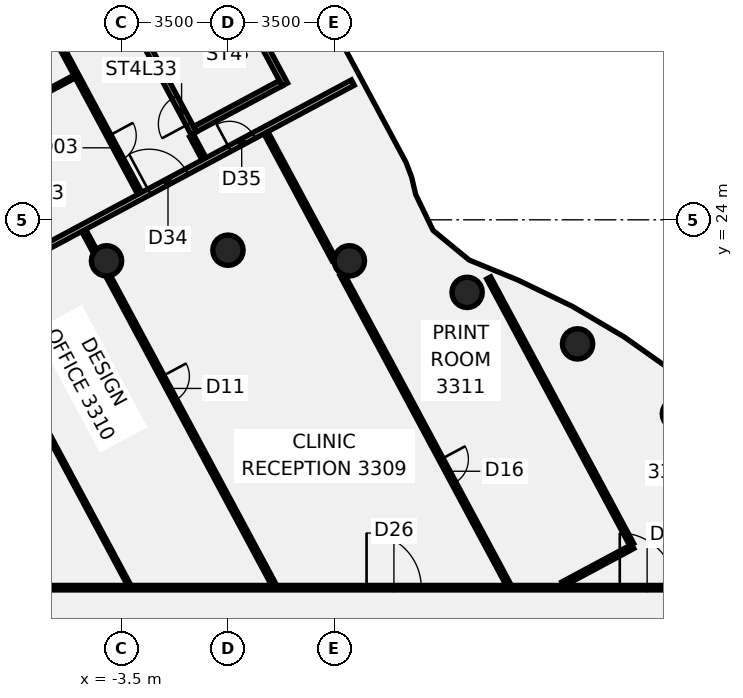
"""IFC4 building model, lengths in metres.
Left out: names, types, materials, properties, quantities, classifications, styles, units other than length and angle.
Written with IfcOpenShell. Run it as: python <this file> out.ifc"""

import sys

from ifc_helpers import new_model, si_unit, direction, frame, frame_2d, origin, origin_2d, place, context, subcontext, project, spatial, rectangle, circle, extrude, element, fill, save


model = new_model("IFC4")
c1 = context("Model", 3, precision=1e-05, world=origin(), true_north=direction((0.0, 1.0)))
c2 = subcontext(c1, "Body", "Model", "MODEL_VIEW")
j1 = project(units=[si_unit("LENGTHUNIT", "METRE"), si_unit("PLANEANGLEUNIT", "RADIAN")], contexts=[c1])
p1 = place(None, origin())
s1 = spatial("IfcSite", under=j1, at=p1, CompositionType="ELEMENT")
p2 = place(p1, origin())
s2 = spatial("IfcBuilding", under=s1, at=p2, CompositionType="ELEMENT")
p3 = place(p2, frame((0.0, 0.0, 136.75)))
s3 = spatial("IfcBuildingStorey", under=s2, at=p3, CompositionType="ELEMENT", Elevation=136.75)
for number, where, z_axis, x_axis in (
    (1, (14.784, 17.619, -0.14), (0.0, 0.0, 1.0), (1.0, 0.0, 0.0)),
    (2, (11.5, 19.919, -0.14), (0.0, 0.0, 1.0), (1.0, 0.0, 0.0)),
    (3, (7.866, 21.613, -0.14), (0.0, 0.0, 1.0), (1.0, 0.0, 0.0)),
    (4, (3.994, 22.651, -0.14), (0.0, 0.0, 1.0), (1.0, 0.0, 0.0)),
    (5, (0.0, 23.0, -0.14), (0.0, 0.0, 1.0), (1.0, 0.0, 0.0)),
    (6, (-3.994, 22.651, -0.14), (0.0, 0.0, 1.0), (1.0, 0.0, 0.0)),
):
    element("IfcColumn", number, at=place(p3, frame(where, z_axis=z_axis, x_axis=x_axis)), inside=s3, PredefinedType="COLUMN", context=c2, shape_type="SweptSolid", body=[
        extrude(circle(Radius=0.5, at=origin_2d()), origin(), (0.0, 0.0, 1.0), 3.75),
    ])
p4 = place(p3, frame((-11.326, 40.577, 0.0), z_axis=(0.0, 0.0, 1.0), x_axis=(0.472718875853, -0.881213291101, 0.0)))
e7 = element("IfcWall", 7, at=p4, inside=s3, PredefinedType="PARTITIONING", context=c2, shape_type="SweptSolid", body=[
    extrude(rectangle(XDim=17.825, YDim=0.15, at=frame_2d((8.912, 0.0))), origin(), (0.0, 0.0, 1.0), 3.01),
])
p5 = place(p4, frame((15.674, 0.0, 0.0)))
e8 = element("IfcOpeningElement", 8, at=p5, cuts=e7, PredefinedType="OPENING", context=c2, shape_type="SweptSolid", body=[
    extrude(rectangle(XDim=0.9, YDim=2.1, at=frame_2d((0.45, 1.05))), frame((0.0, 0.085, 0.0), z_axis=(0.0, -1.0, 0.0), x_axis=(1.0, 0.0, 0.0)), (0.0, 0.0, 1.0), 0.17),
])
p6 = place(p4, frame((10.125, 0.0, 0.0)))
e9 = element("IfcOpeningElement", 9, at=p6, cuts=e7, PredefinedType="OPENING", context=c2, shape_type="SweptSolid", body=[
    extrude(rectangle(XDim=0.9, YDim=2.1, at=frame_2d((0.45, 1.05))), frame((0.0, 0.085, 0.0), z_axis=(0.0, -1.0, 0.0), x_axis=(1.0, 0.0, 0.0)), (0.0, 0.0, 1.0), 0.17),
])
p7 = place(p4, frame((6.824, 0.0, 0.0)))
e10 = element("IfcOpeningElement", 10, at=p7, cuts=e7, PredefinedType="OPENING", context=c2, shape_type="SweptSolid", body=[
    extrude(rectangle(XDim=0.9, YDim=2.1, at=frame_2d((0.45, 1.05))), frame((0.0, 0.085, 0.0), z_axis=(0.0, -1.0, 0.0), x_axis=(1.0, 0.0, 0.0)), (0.0, 0.0, 1.0), 0.17),
])
p8 = place(p4, frame((2.325, 0.0, 0.0)))
e11 = element("IfcOpeningElement", 11, at=p8, cuts=e7, PredefinedType="OPENING", context=c2, shape_type="SweptSolid", body=[
    extrude(rectangle(XDim=0.9, YDim=2.1, at=frame_2d((0.45, 1.05))), frame((0.0, 0.085, 0.0), z_axis=(0.0, -1.0, 0.0), x_axis=(1.0, 0.0, 0.0)), (0.0, 0.0, 1.0), 0.17),
])
p9 = place(p3, frame((-8.247, 21.297, 0.0), z_axis=(0.0, 0.0, 1.0), x_axis=(0.472660277338, -0.881244723234, 0.0)))
e12 = element("IfcWall", 12, at=p9, inside=s3, PredefinedType="PARTITIONING", context=c2, shape_type="SweptSolid", body=[
    extrude(rectangle(XDim=10.573, YDim=0.1, at=frame_2d((5.287, 0.0))), origin(), (0.0, 0.0, 1.0), 3.01),
])
p10 = place(p3, frame((-1.193, 26.762, 0.0), z_axis=(0.0, 0.0, 1.0), x_axis=(0.472575809363, -0.881290022867, 0.0)))
e13 = element("IfcWall", 13, at=p10, inside=s3, PredefinedType="PARTITIONING", context=c2, shape_type="SweptSolid", body=[
    extrude(rectangle(XDim=0.86, YDim=0.15, at=frame_2d((0.43, 0.0))), origin(), (0.0, 0.0, 1.0), 3.01),
])
p11 = place(p3, frame((-4.745, 23.653, 0.0), z_axis=(0.0, 0.0, 1.0), x_axis=(0.472438455884, -0.881363662401, 0.0)))
e14 = element("IfcWall", 14, at=p11, inside=s3, PredefinedType="PARTITIONING", context=c2, shape_type="SweptSolid", body=[
    extrude(rectangle(XDim=0.78, YDim=0.15, at=frame_2d((0.39, 0.0))), origin(), (0.0, 0.0, 1.0), 3.01),
])
p12 = place(p3, frame((-3.941, 22.155, 0.0), z_axis=(0.0, 0.0, 1.0), x_axis=(0.472663740914, -0.881242865517, 0.0)))
e15 = element("IfcWall", 15, at=p12, inside=s3, PredefinedType="PARTITIONING", context=c2, shape_type="SweptSolid", body=[
    extrude(rectangle(XDim=11.532, YDim=0.15, at=frame_2d((5.766, 0.0))), origin(), (0.0, 0.0, 1.0), 3.01),
])
p13 = place(p12, frame((3.75, 0.0, 0.0)))
e16 = element("IfcOpeningElement", 16, at=p13, cuts=e15, PredefinedType="OPENING", context=c2, shape_type="SweptSolid", body=[
    extrude(rectangle(XDim=0.9, YDim=2.1, at=frame_2d((0.45, 1.05))), frame((0.0, 0.085, 0.0), z_axis=(0.0, -1.0, 0.0), x_axis=(1.0, 0.0, 0.0)), (0.0, 0.0, 1.0), 0.17),
])
p14 = place(p3, frame((1.25, 26.864, 0.0), z_axis=(0.0, 0.0, 1.0), x_axis=(0.472715386163, -0.881215163104, 0.0)))
e17 = element("IfcWall", 17, at=p14, inside=s3, PredefinedType="PARTITIONING", context=c2, shape_type="SweptSolid", body=[
    extrude(rectangle(XDim=4.745, YDim=0.15, at=frame_2d((2.373, 0.0))), origin(), (0.0, 0.0, 1.0), 3.01),
])
p15 = place(p3, frame((3.748, 22.207, 0.0), z_axis=(0.0, 0.0, 1.0), x_axis=(0.472684868369, -0.881231533262, 0.0)))
e18 = element("IfcWall", 18, at=p15, inside=s3, PredefinedType="PARTITIONING", context=c2, shape_type="SweptSolid", body=[
    extrude(rectangle(XDim=11.591, YDim=0.15, at=frame_2d((5.795, 0.0))), origin(), (0.0, 0.0, 1.0), 3.01),
])
p16 = place(p15, frame((6.9, 0.0, 0.0)))
e19 = element("IfcOpeningElement", 19, at=p16, cuts=e18, PredefinedType="OPENING", context=c2, shape_type="SweptSolid", body=[
    extrude(rectangle(XDim=0.9, YDim=2.1, at=frame_2d((0.45, 1.05))), frame((0.0, 0.085, 0.0), z_axis=(0.0, -1.0, 0.0), x_axis=(1.0, 0.0, 0.0)), (0.0, 0.0, 1.0), 0.17),
])
p17 = place(p3, frame((8.577, 22.087, 0.0), z_axis=(0.0, 0.0, 1.0), x_axis=(0.472681056818, -0.881233577734, 0.0)))
e20 = element("IfcWall", 20, at=p17, inside=s3, PredefinedType="PARTITIONING", context=c2, shape_type="SweptSolid", body=[
    extrude(rectangle(XDim=9.948, YDim=0.15, at=frame_2d((4.974, 0.0))), origin(), (0.0, 0.0, 1.0), 3.01),
])
p18 = place(p3, frame((-17.065, 11.9, 0.0), z_axis=(0.0, 0.0, 1.0), x_axis=(1.0, 0.0, 0.0)))
e21 = element("IfcWall", 21, at=p18, inside=s3, PredefinedType="PARTITIONING", context=c2, shape_type="SweptSolid", body=[
    extrude(rectangle(XDim=34.165, YDim=0.15, at=frame_2d((17.083, 0.0))), origin(), (0.0, 0.0, 1.0), 3.01),
])
p19 = place(p18, frame((21.624, 0.0, 0.0)))
e22 = element("IfcOpeningElement", 22, at=p19, cuts=e21, PredefinedType="OPENING", context=c2, shape_type="SweptSolid", body=[
    extrude(rectangle(XDim=1.8, YDim=2.1, at=frame_2d((0.9, 1.05))), frame((0.0, 0.085, 0.0), z_axis=(0.0, -1.0, 0.0), x_axis=(1.0, 0.0, 0.0)), (0.0, 0.0, 1.0), 0.17),
])
p20 = place(p18, frame((29.953, 0.0, 0.0)))
e23 = element("IfcOpeningElement", 23, at=p20, cuts=e21, PredefinedType="OPENING", context=c2, shape_type="SweptSolid", body=[
    extrude(rectangle(XDim=1.8, YDim=2.1, at=frame_2d((0.9, 1.05))), frame((0.0, 0.085, 0.0), z_axis=(0.0, -1.0, 0.0), x_axis=(1.0, 0.0, 0.0)), (0.0, 0.0, 1.0), 0.17),
])
p21 = place(p18, frame((6.115, 0.0, 0.0)))
e24 = element("IfcOpeningElement", 24, at=p21, cuts=e21, PredefinedType="OPENING", context=c2, shape_type="SweptSolid", body=[
    extrude(rectangle(XDim=1.8, YDim=2.1, at=frame_2d((0.9, 1.05))), frame((0.0, 0.085, 0.0), z_axis=(0.0, -1.0, 0.0), x_axis=(1.0, 0.0, 0.0)), (0.0, 0.0, 1.0), 0.17),
])
p22 = place(p3, frame((-8.308, 26.962, 0.0), z_axis=(0.0, 0.0, 1.0), x_axis=(0.881217925231, 0.472710237091, 0.0)))
e25 = element("IfcWall", 25, at=p22, inside=s3, PredefinedType="PARTITIONING", context=c2, shape_type="SweptSolid", body=[
    extrude(rectangle(XDim=3.7, YDim=0.1, at=frame_2d((1.85, 0.0))), origin(), (0.0, 0.0, 1.0), 3.01),
])
p23 = place(p3, frame((-7.829, 22.113, 0.0), z_axis=(0.0, 0.0, 1.0), x_axis=(0.881304927749, 0.472548012719, 0.0)))
e26 = element("IfcWall", 26, at=p23, inside=s3, PredefinedType="PARTITIONING", context=c2, shape_type="SweptSolid", body=[
    extrude(rectangle(XDim=13.544, YDim=0.2, at=frame_2d((6.772, 0.0))), origin(), (0.0, 0.0, 1.0), 3.01),
])
p24 = place(p23, frame((5.945, 0.0, 0.0)))
e27 = element("IfcOpeningElement", 27, at=p24, cuts=e26, PredefinedType="OPENING", context=c2, shape_type="SweptSolid", body=[
    extrude(rectangle(XDim=1.4, YDim=2.1, at=frame_2d((0.7, 1.05))), frame((0.0, 0.11, 0.0), z_axis=(0.0, -1.0, 0.0), x_axis=(1.0, 0.0, 0.0)), (0.0, 0.0, 1.0), 0.22),
])
p25 = place(p23, frame((8.945, 0.0, 0.0)))
e28 = element("IfcOpeningElement", 28, at=p25, cuts=e26, PredefinedType="OPENING", context=c2, shape_type="SweptSolid", body=[
    extrude(rectangle(XDim=0.9, YDim=2.1, at=frame_2d((0.45, 1.05))), frame((0.0, 0.11, 0.0), z_axis=(0.0, -1.0, 0.0), x_axis=(1.0, 0.0, 0.0)), (0.0, 0.0, 1.0), 0.22),
])
p26 = place(p3, frame((11.017, 12.023, 0.0), z_axis=(0.0, 0.0, 1.0), x_axis=(0.881329583371, 0.472502026954, 0.0)))
e29 = element("IfcWall", 29, at=p26, inside=s3, PredefinedType="PARTITIONING", context=c2, shape_type="SweptSolid", body=[
    extrude(rectangle(XDim=2.607, YDim=0.15, at=frame_2d((1.304, 0.0))), origin(), (0.0, 0.0, 1.0), 3.01),
])
p27 = place(p3, frame((-1.123, 26.844, -0.14), z_axis=(0.0, 0.0, 1.0), x_axis=(-0.472697625676, 0.881224690235, 0.0)))
e30 = element("IfcWall", 30, at=p27, inside=s3, PredefinedType="SHEAR", context=c2, shape_type="SweptSolid", body=[
    extrude(rectangle(XDim=6.7, YDim=0.2, at=frame_2d((3.35, 0.0))), origin(), (0.0, 0.0, 1.0), 3.15),
])
p28 = place(p27, frame((0.35, 0.0, 0.0)))
e31 = element("IfcOpeningElement", 31, at=p28, cuts=e30, PredefinedType="OPENING", context=c2, shape_type="SweptSolid", body=[
    extrude(rectangle(XDim=1.0, YDim=2.1, at=frame_2d((0.5, 1.05))), frame((0.0, 0.11, 0.0), z_axis=(0.0, -1.0, 0.0), x_axis=(1.0, 0.0, 0.0)), (0.0, 0.0, 1.0), 0.22),
])
p29 = place(p3, frame((1.873, 28.452, -0.14), z_axis=(0.0, 0.0, 1.0), x_axis=(-0.472697625676, 0.881224690235, 0.0)))
e32 = element("IfcWall", 32, at=p29, inside=s3, PredefinedType="SHEAR", context=c2, shape_type="SweptSolid", body=[
    extrude(rectangle(XDim=6.7, YDim=0.2, at=frame_2d((3.35, 0.0))), origin(), (0.0, 0.0, 1.0), 3.15),
])
p30 = place(p3, frame((1.737, 28.492, -0.14), z_axis=(0.0, 0.0, 1.0), x_axis=(-0.88120988154, -0.47272523169, 0.0)))
e33 = element("IfcWall", 33, at=p30, inside=s3, PredefinedType="SHEAR", context=c2, shape_type="SweptSolid", body=[
    extrude(rectangle(XDim=3.2, YDim=0.2, at=frame_2d((1.6, 0.0))), origin(), (0.0, 0.0, 1.0), 3.15),
])
p31 = place(p5, frame((0.9, 0.0, 0.0), z_axis=(0.0, 0.0, 1.0), x_axis=(-1.0, 0.0, 0.0)))
e34 = element("IfcDoor", 34, at=p31, inside=s3, OperationType="SINGLE_SWING_RIGHT", PredefinedType="DOOR", context=c2, shape_type="SweptSolid", body=[
    extrude(rectangle(XDim=0.9, YDim=2.1, at=frame_2d((0.45, 1.05))), frame((0.0, 0.025, 0.0), z_axis=(0.0, -1.0, 0.0), x_axis=(1.0, 0.0, 0.0)), (0.0, 0.0, 1.0), 0.05),
])
fill(e8, e34)
p32 = place(p13, frame((0.9, 0.0, 0.0), z_axis=(0.0, 0.0, 1.0), x_axis=(-1.0, 0.0, 0.0)))
e35 = element("IfcDoor", 35, at=p32, inside=s3, OperationType="SINGLE_SWING_LEFT", PredefinedType="DOOR", context=c2, shape_type="SweptSolid", body=[
    extrude(rectangle(XDim=0.9, YDim=2.1, at=frame_2d((0.45, 1.05))), frame((0.0, 0.025, 0.0), z_axis=(0.0, -1.0, 0.0), x_axis=(1.0, 0.0, 0.0)), (0.0, 0.0, 1.0), 0.05),
])
fill(e16, e35)
p33 = place(p16, origin())
e36 = element("IfcDoor", 36, at=p33, inside=s3, OperationType="SINGLE_SWING_LEFT", PredefinedType="DOOR", context=c2, shape_type="SweptSolid", body=[
    extrude(rectangle(XDim=0.9, YDim=2.1, at=frame_2d((0.45, 1.05))), frame((0.0, 0.025, 0.0), z_axis=(0.0, -1.0, 0.0), x_axis=(1.0, 0.0, 0.0)), (0.0, 0.0, 1.0), 0.05),
])
fill(e19, e36)
p34 = place(p19, frame((1.8, 0.0, 0.0), z_axis=(0.0, 0.0, 1.0), x_axis=(-1.0, 0.0, 0.0)))
e37 = element("IfcDoor", 37, at=p34, inside=s3, OperationType="DOUBLE_DOOR_SINGLE_SWING", PredefinedType="DOOR", context=c2, shape_type="SweptSolid", body=[
    extrude(rectangle(XDim=1.8, YDim=2.1, at=frame_2d((0.9, 1.05))), frame((0.0, 0.025, 0.0), z_axis=(0.0, -1.0, 0.0), x_axis=(1.0, 0.0, 0.0)), (0.0, 0.0, 1.0), 0.05),
])
fill(e22, e37)
p35 = place(p20, origin())
e38 = element("IfcDoor", 38, at=p35, inside=s3, OperationType="DOUBLE_DOOR_SINGLE_SWING", PredefinedType="DOOR", context=c2, shape_type="SweptSolid", body=[
    extrude(rectangle(XDim=1.8, YDim=2.1, at=frame_2d((0.9, 1.05))), frame((0.0, 0.025, 0.0), z_axis=(0.0, -1.0, 0.0), x_axis=(1.0, 0.0, 0.0)), (0.0, 0.0, 1.0), 0.05),
])
fill(e23, e38)
p36 = place(p24, frame((1.4, 0.0, 0.0), z_axis=(0.0, 0.0, 1.0), x_axis=(-1.0, 0.0, 0.0)))
e39 = element("IfcDoor", 39, at=p36, inside=s3, OperationType="DOUBLE_DOOR_SINGLE_SWING", PredefinedType="DOOR", context=c2, shape_type="SweptSolid", body=[
    extrude(rectangle(XDim=1.4, YDim=2.1, at=frame_2d((0.7, 1.05))), frame((0.0, 0.025, 0.0), z_axis=(0.0, -1.0, 0.0), x_axis=(1.0, 0.0, 0.0)), (0.0, 0.0, 1.0), 0.05),
])
fill(e27, e39)
p37 = place(p25, origin())
e40 = element("IfcDoor", 40, at=p37, inside=s3, OperationType="SINGLE_SWING_LEFT", PredefinedType="DOOR", context=c2, shape_type="SweptSolid", body=[
    extrude(rectangle(XDim=0.9, YDim=2.1, at=frame_2d((0.45, 1.05))), frame((0.0, 0.025, 0.0), z_axis=(0.0, -1.0, 0.0), x_axis=(1.0, 0.0, 0.0)), (0.0, 0.0, 1.0), 0.05),
])
fill(e28, e40)
p38 = place(p28, origin())
e41 = element("IfcDoor", 41, at=p38, inside=s3, OperationType="SINGLE_SWING_LEFT", PredefinedType="DOOR", context=c2, shape_type="SweptSolid", body=[
    extrude(rectangle(XDim=1.0, YDim=2.1, at=frame_2d((0.5, 1.05))), frame((0.0, 0.025, 0.0), z_axis=(0.0, -1.0, 0.0), x_axis=(1.0, 0.0, 0.0)), (0.0, 0.0, 1.0), 0.05),
])
fill(e31, e41)
save(model, sys.argv[1])
